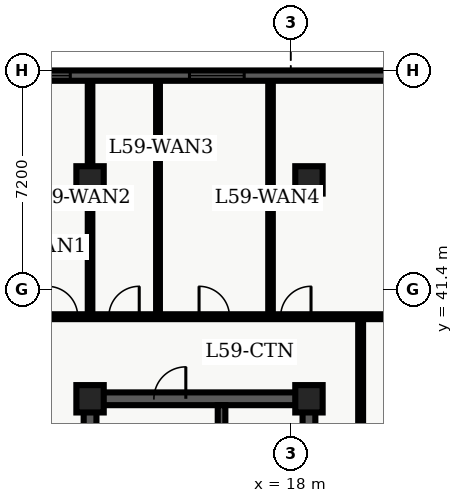
"""IFC4 building model, lengths in metres.
Left out: names, types, materials, properties, quantities, classifications, styles, units other than length and angle.
Written with IfcOpenShell. Run it as: python <this file> out.ifc"""

import sys

from ifc_helpers import new_model, entity, si_unit, converted_unit, direction, frame, origin_with_axes, origin_2d_with_axis, place, context, subcontext, project, spatial, polyline, rectangle, outline, extrude, element, fill, save


model = new_model("IFC4")
c1 = context("Model", 3, precision=1e-05, world=origin_with_axes(), true_north=direction((0.0, 1.0)))
c2 = subcontext(c1, "Body", "Model", "MODEL_VIEW")
j1 = project(units=[si_unit("LENGTHUNIT", "METRE"), converted_unit("PLANEANGLEUNIT", "DEGREE", entity("IfcPlaneAngleMeasure", 0.017), si_unit("PLANEANGLEUNIT", "RADIAN"), dimensions=[0, 0, 0, 0, 0, 0, 0])], contexts=[c1])
p1 = place(None, origin_with_axes())
s1 = spatial("IfcSite", under=j1, at=p1, CompositionType="ELEMENT")
p2 = place(p1, origin_with_axes())
s2 = spatial("IfcBuilding", under=s1, at=p2, CompositionType="ELEMENT")
p3 = place(p2, frame((0.0, 0.0, 240.3), z_axis=(0.0, 0.0, 1.0), x_axis=(1.0, 0.0, 0.0)))
s3 = spatial("IfcBuildingStorey", under=s2, at=p3, CompositionType="ELEMENT", Elevation=240.3)
p4 = place(p3, frame((11.4, 10.8, 0.0), z_axis=(0.0, 0.0, 1.0), x_axis=(0.0, 1.0, 0.0)))
e1 = element("IfcWall", 1, at=p4, inside=s3, PredefinedType="SHEAR", context=c2, shape_type="SweptSolid", body=[
    extrude(outline(polyline([(0.0, -0.21), (27.0, -0.21), (27.0, 0.21), (0.0, 0.21), (0.0, -0.21)])), origin_with_axes(), (0.0, 0.0, 1.0), 3.66),
])
p5 = place(p3, frame((11.4, 37.8, 0.0), z_axis=(0.0, 0.0, 1.0), x_axis=(1.0, 0.0, 0.0)))
e2 = element("IfcWall", 2, at=p5, inside=s3, PredefinedType="SHEAR", context=c2, shape_type="SweptSolid", body=[
    extrude(outline(polyline([(0.0, -0.21), (7.2, -0.21), (7.2, 0.21), (0.0, 0.21), (0.0, -0.21)])), origin_with_axes(), (0.0, 0.0, 1.0), 3.66),
])
p6 = place(p5, frame((2.625, 0.0, 0.0), z_axis=(0.0, 0.0, 1.0), x_axis=(1.0, 0.0, 0.0)))
e3 = element("IfcOpeningElement", 3, at=p6, cuts=e2, PredefinedType="OPENING", context=c2, shape_type="SweptSolid", body=[
    extrude(rectangle(XDim=1.05, YDim=0.44, at=origin_2d_with_axis()), origin_with_axes(), (0.0, 0.0, 1.0), 2.15),
])
p7 = place(p3, frame((18.6, 24.3, 0.0), z_axis=(0.0, 0.0, 1.0), x_axis=(0.0, 1.0, 0.0)))
e4 = element("IfcWall", 4, at=p7, inside=s3, PredefinedType="SHEAR", context=c2, shape_type="SweptSolid", body=[
    extrude(outline(polyline([(0.0, -0.21), (13.5, -0.21), (13.5, 0.21), (0.0, 0.21), (0.0, -0.21)])), origin_with_axes(), (0.0, 0.0, 1.0), 3.66),
])
p8 = place(p7, frame((6.725, 0.0, 0.0), z_axis=(0.0, 0.0, 1.0), x_axis=(1.0, 0.0, 0.0)))
e5 = element("IfcOpeningElement", 5, at=p8, cuts=e4, PredefinedType="OPENING", context=c2, shape_type="SweptSolid", body=[
    extrude(rectangle(XDim=1.05, YDim=0.44, at=origin_2d_with_axis()), origin_with_axes(), (0.0, 0.0, 1.0), 2.15),
])
p9 = place(p7, frame((11.125, 0.0, 0.0), z_axis=(0.0, 0.0, 1.0), x_axis=(1.0, 0.0, 0.0)))
e6 = element("IfcOpeningElement", 6, at=p9, cuts=e4, PredefinedType="OPENING", context=c2, shape_type="SweptSolid", body=[
    extrude(rectangle(XDim=1.05, YDim=0.44, at=origin_2d_with_axis()), origin_with_axes(), (0.0, 0.0, 1.0), 2.15),
])
p10 = place(p3, frame((15.725, 28.9, 0.0), z_axis=(0.0, 0.0, 1.0), x_axis=(0.0, 1.0, 0.0)))
e7 = element("IfcWall", 7, at=p10, inside=s3, PredefinedType="SHEAR", context=c2, shape_type="SweptSolid", body=[
    extrude(outline(polyline([(0.0, -0.125), (8.69, -0.125), (8.69, 0.125), (0.0, 0.125), (0.0, -0.125)])), origin_with_axes(), (0.0, 0.0, 1.0), 3.66),
])
for number, where, z_axis, x_axis in (
    (8, (11.4, 37.8, 0.0), (0.0, 0.0, 1.0), (1.0, 0.0, 0.0)),
    (9, (11.4, 45.0, 0.0), (0.0, 0.0, 1.0), (1.0, 0.0, 0.0)),
    (10, (18.6, 37.8, 0.0), (0.0, 0.0, 1.0), (1.0, 0.0, 0.0)),
    (11, (18.6, 45.0, 0.0), (0.0, 0.0, 1.0), (1.0, 0.0, 0.0)),
):
    element("IfcColumn", number, at=place(p3, frame(where, z_axis=z_axis, x_axis=x_axis)), inside=s3, PredefinedType="COLUMN", context=c2, shape_type="SweptSolid", body=[
        extrude(rectangle(XDim=0.9, YDim=0.9, at=origin_2d_with_axis()), origin_with_axes(), (0.0, 0.0, 1.0), 3.9),
    ])
p11 = place(p3, frame((7.1, 40.5, 0.0), z_axis=(0.0, 0.0, 1.0), x_axis=(1.0, 0.0, 0.0)))
e12 = element("IfcWall", 12, at=p11, inside=s3, PredefinedType="PARTITIONING", context=c2, shape_type="SweptSolid", body=[
    extrude(outline(polyline([(0.0, -0.08), (24.965, -0.08), (24.965, 0.08), (0.0, 0.08), (0.0, -0.08)])), origin_with_axes(), (0.0, 0.0, 1.0), 2.7),
])
p12 = place(p11, frame((3.395, 0.0, 0.0), z_axis=(0.0, 0.0, 1.0), x_axis=(1.0, 0.0, 0.0)))
e13 = element("IfcOpeningElement", 13, at=p12, cuts=e12, PredefinedType="OPENING", context=c2, shape_type="SweptSolid", body=[
    extrude(rectangle(XDim=1.0, YDim=0.18, at=origin_2d_with_axis()), origin_with_axes(), (0.0, 0.0, 1.0), 2.15),
])
p13 = place(p11, frame((5.418, 0.0, 0.0), z_axis=(0.0, 0.0, 1.0), x_axis=(1.0, 0.0, 0.0)))
e14 = element("IfcOpeningElement", 14, at=p13, cuts=e12, PredefinedType="OPENING", context=c2, shape_type="SweptSolid", body=[
    extrude(rectangle(XDim=1.0, YDim=0.18, at=origin_2d_with_axis()), origin_with_axes(), (0.0, 0.0, 1.0), 2.15),
])
p14 = place(p11, frame((8.386, 0.0, 0.0), z_axis=(0.0, 0.0, 1.0), x_axis=(1.0, 0.0, 0.0)))
e15 = element("IfcOpeningElement", 15, at=p14, cuts=e12, PredefinedType="OPENING", context=c2, shape_type="SweptSolid", body=[
    extrude(rectangle(XDim=1.0, YDim=0.18, at=origin_2d_with_axis()), origin_with_axes(), (0.0, 0.0, 1.0), 2.15),
])
p15 = place(p11, frame((11.068, 0.0, 0.0), z_axis=(0.0, 0.0, 1.0), x_axis=(1.0, 0.0, 0.0)))
e16 = element("IfcOpeningElement", 16, at=p15, cuts=e12, PredefinedType="OPENING", context=c2, shape_type="SweptSolid", body=[
    extrude(rectangle(XDim=1.0, YDim=0.18, at=origin_2d_with_axis()), origin_with_axes(), (0.0, 0.0, 1.0), 2.15),
])
p16 = place(p3, frame((20.3, 7.8, 0.0), z_axis=(0.0, 0.0, 1.0), x_axis=(0.0, 1.0, 0.0)))
e17 = element("IfcWall", 17, at=p16, inside=s3, PredefinedType="PARTITIONING", context=c2, shape_type="SweptSolid", body=[
    extrude(outline(polyline([(0.0, -0.08), (32.7, -0.08), (32.7, 0.08), (0.0, 0.08), (0.0, -0.08)])), origin_with_axes(), (0.0, 0.0, 1.0), 2.7),
])
p17 = place(p16, frame((14.55, 0.0, 0.0), z_axis=(0.0, 0.0, 1.0), x_axis=(1.0, 0.0, 0.0)))
e18 = element("IfcOpeningElement", 18, at=p17, cuts=e17, PredefinedType="OPENING", context=c2, shape_type="SweptSolid", body=[
    extrude(rectangle(XDim=0.9, YDim=0.18, at=origin_2d_with_axis()), origin_with_axes(), (0.0, 0.0, 1.0), 2.15),
])
p18 = place(p16, frame((18.86, 0.0, 0.0), z_axis=(0.0, 0.0, 1.0), x_axis=(1.0, 0.0, 0.0)))
e19 = element("IfcOpeningElement", 19, at=p18, cuts=e17, PredefinedType="OPENING", context=c2, shape_type="SweptSolid", body=[
    extrude(rectangle(XDim=1.0, YDim=0.18, at=origin_2d_with_axis()), origin_with_axes(), (0.0, 0.0, 1.0), 2.15),
])
p19 = place(p16, frame((24.276, 0.0, 0.0), z_axis=(0.0, 0.0, 1.0), x_axis=(1.0, 0.0, 0.0)))
e20 = element("IfcOpeningElement", 20, at=p19, cuts=e17, PredefinedType="OPENING", context=c2, shape_type="SweptSolid", body=[
    extrude(rectangle(XDim=1.0, YDim=0.18, at=origin_2d_with_axis()), origin_with_axes(), (0.0, 0.0, 1.0), 2.15),
])
p20 = place(p16, frame((27.491, 0.0, 0.0), z_axis=(0.0, 0.0, 1.0), x_axis=(1.0, 0.0, 0.0)))
e21 = element("IfcOpeningElement", 21, at=p20, cuts=e17, PredefinedType="OPENING", context=c2, shape_type="SweptSolid", body=[
    extrude(rectangle(XDim=1.0, YDim=0.18, at=origin_2d_with_axis()), origin_with_axes(), (0.0, 0.0, 1.0), 2.15),
])
p21 = place(p16, frame((5.775, 0.0, 0.0), z_axis=(0.0, 0.0, 1.0), x_axis=(1.0, 0.0, 0.0)))
e22 = element("IfcOpeningElement", 22, at=p21, cuts=e17, PredefinedType="OPENING", context=c2, shape_type="SweptSolid", body=[
    extrude(rectangle(XDim=1.05, YDim=0.18, at=origin_2d_with_axis()), origin_with_axes(), (0.0, 0.0, 1.0), 2.15),
])
p22 = place(p3, frame((11.4, 40.6, 0.0), z_axis=(0.0, 0.0, 1.0), x_axis=(0.0, 1.0, 0.0)))
e23 = element("IfcWall", 23, at=p22, inside=s3, PredefinedType="PARTITIONING", context=c2, shape_type="SweptSolid", body=[
    extrude(outline(polyline([(0.0, -0.075), (7.665, -0.075), (7.665, 0.075), (0.0, 0.075), (0.0, -0.075)])), origin_with_axes(), (0.0, 0.0, 1.0), 2.7),
])
p23 = place(p3, frame((13.635, 40.6, 0.0), z_axis=(0.0, 0.0, 1.0), x_axis=(0.0, 1.0, 0.0)))
e24 = element("IfcWall", 24, at=p23, inside=s3, PredefinedType="PARTITIONING", context=c2, shape_type="SweptSolid", body=[
    extrude(outline(polyline([(0.0, -0.062), (7.665, -0.062), (7.665, 0.062), (0.0, 0.062), (0.0, -0.062)])), origin_with_axes(), (0.0, 0.0, 1.0), 2.7),
])
p24 = place(p3, frame((17.336, 40.6, 0.0), z_axis=(0.0, 0.0, 1.0), x_axis=(0.0, 1.0, 0.0)))
e25 = element("IfcWall", 25, at=p24, inside=s3, PredefinedType="PARTITIONING", context=c2, shape_type="SweptSolid", body=[
    extrude(outline(polyline([(0.0, -0.075), (7.665, -0.075), (7.665, 0.075), (0.0, 0.075), (0.0, -0.075)])), origin_with_axes(), (0.0, 0.0, 1.0), 2.7),
])
p25 = place(p3, frame((7.24, 48.43, 0.0), z_axis=(0.0, 0.0, 1.0), x_axis=(1.0, 0.0, 0.0)))
e26 = element("IfcWall", 26, at=p25, inside=s3, PredefinedType="SOLIDWALL", context=c2, shape_type="SweptSolid", body=[
    extrude(outline(polyline([(0.0, -0.17), (18.36, -0.17), (18.36, 0.17), (0.0, 0.17), (0.0, -0.17)])), origin_with_axes(), (0.0, 0.0, 1.0), 3.66),
])
p26 = place(p25, frame((2.61, 0.0, 0.45), z_axis=(0.0, 0.0, 1.0), x_axis=(1.0, 0.0, 0.0)))
e27 = element("IfcOpeningElement", 27, at=p26, cuts=e26, PredefinedType="OPENING", context=c2, shape_type="SweptSolid", body=[
    extrude(rectangle(XDim=1.8, YDim=0.36, at=origin_2d_with_axis()), origin_with_axes(), (0.0, 0.0, 1.0), 2.1),
])
p27 = place(p25, frame((8.33, 0.0, 0.45), z_axis=(0.0, 0.0, 1.0), x_axis=(1.0, 0.0, 0.0)))
e28 = element("IfcOpeningElement", 28, at=p27, cuts=e26, PredefinedType="OPENING", context=c2, shape_type="SweptSolid", body=[
    extrude(rectangle(XDim=1.8, YDim=0.36, at=origin_2d_with_axis()), origin_with_axes(), (0.0, 0.0, 1.0), 2.1),
])
p28 = place(p25, frame((14.9, 0.0, 0.45), z_axis=(0.0, 0.0, 1.0), x_axis=(1.0, 0.0, 0.0)))
e29 = element("IfcOpeningElement", 29, at=p28, cuts=e26, PredefinedType="OPENING", context=c2, shape_type="SweptSolid", body=[
    extrude(rectangle(XDim=1.8, YDim=0.36, at=origin_2d_with_axis()), origin_with_axes(), (0.0, 0.0, 1.0), 2.1),
])
p29 = place(p5, frame((2.625, 0.0, 0.0), z_axis=(0.0, 0.0, 1.0), x_axis=(1.0, 0.0, 0.0)))
e30 = element("IfcDoor", 30, at=p29, inside=s3, OperationType="SINGLE_SWING_RIGHT", PredefinedType="DOOR", context=c2, shape_type="SweptSolid", body=[
    extrude(rectangle(XDim=1.05, YDim=0.09, at=origin_2d_with_axis()), origin_with_axes(), (0.0, 0.0, 1.0), 2.15),
])
fill(e3, e30)
p30 = place(p11, frame((3.395, 0.0, 0.0), z_axis=(0.0, 0.0, 1.0), x_axis=(1.0, 0.0, 0.0)))
e31 = element("IfcDoor", 31, at=p30, inside=s3, OperationType="SINGLE_SWING_LEFT", PredefinedType="DOOR", context=c2, shape_type="SweptSolid", body=[
    extrude(rectangle(XDim=1.0, YDim=0.09, at=origin_2d_with_axis()), origin_with_axes(), (0.0, 0.0, 1.0), 2.15),
])
fill(e13, e31)
p31 = place(p11, frame((5.418, 0.0, 0.0), z_axis=(0.0, 0.0, 1.0), x_axis=(1.0, 0.0, 0.0)))
e32 = element("IfcDoor", 32, at=p31, inside=s3, OperationType="SINGLE_SWING_RIGHT", PredefinedType="DOOR", context=c2, shape_type="SweptSolid", body=[
    extrude(rectangle(XDim=1.0, YDim=0.09, at=origin_2d_with_axis()), origin_with_axes(), (0.0, 0.0, 1.0), 2.15),
])
fill(e14, e32)
p32 = place(p11, frame((8.386, 0.0, 0.0), z_axis=(0.0, 0.0, 1.0), x_axis=(1.0, 0.0, 0.0)))
e33 = element("IfcDoor", 33, at=p32, inside=s3, OperationType="SINGLE_SWING_LEFT", PredefinedType="DOOR", context=c2, shape_type="SweptSolid", body=[
    extrude(rectangle(XDim=1.0, YDim=0.09, at=origin_2d_with_axis()), origin_with_axes(), (0.0, 0.0, 1.0), 2.15),
])
fill(e15, e33)
p33 = place(p11, frame((11.068, 0.0, 0.0), z_axis=(0.0, 0.0, 1.0), x_axis=(1.0, 0.0, 0.0)))
e34 = element("IfcDoor", 34, at=p33, inside=s3, OperationType="SINGLE_SWING_RIGHT", PredefinedType="DOOR", context=c2, shape_type="SweptSolid", body=[
    extrude(rectangle(XDim=1.0, YDim=0.09, at=origin_2d_with_axis()), origin_with_axes(), (0.0, 0.0, 1.0), 2.15),
])
fill(e16, e34)
p34 = place(p25, frame((2.61, 0.0, 0.45), z_axis=(0.0, 0.0, 1.0), x_axis=(1.0, 0.0, 0.0)))
e35 = element("IfcWindow", 35, at=p34, inside=s3, PredefinedType="WINDOW", context=c2, shape_type="SweptSolid", body=[
    extrude(rectangle(XDim=1.8, YDim=0.09, at=origin_2d_with_axis()), origin_with_axes(), (0.0, 0.0, 1.0), 2.1),
])
fill(e27, e35)
p35 = place(p25, frame((8.33, 0.0, 0.45), z_axis=(0.0, 0.0, 1.0), x_axis=(1.0, 0.0, 0.0)))
e36 = element("IfcWindow", 36, at=p35, inside=s3, PredefinedType="WINDOW", context=c2, shape_type="SweptSolid", body=[
    extrude(rectangle(XDim=1.8, YDim=0.09, at=origin_2d_with_axis()), origin_with_axes(), (0.0, 0.0, 1.0), 2.1),
])
fill(e28, e36)
save(model, sys.argv[1])
